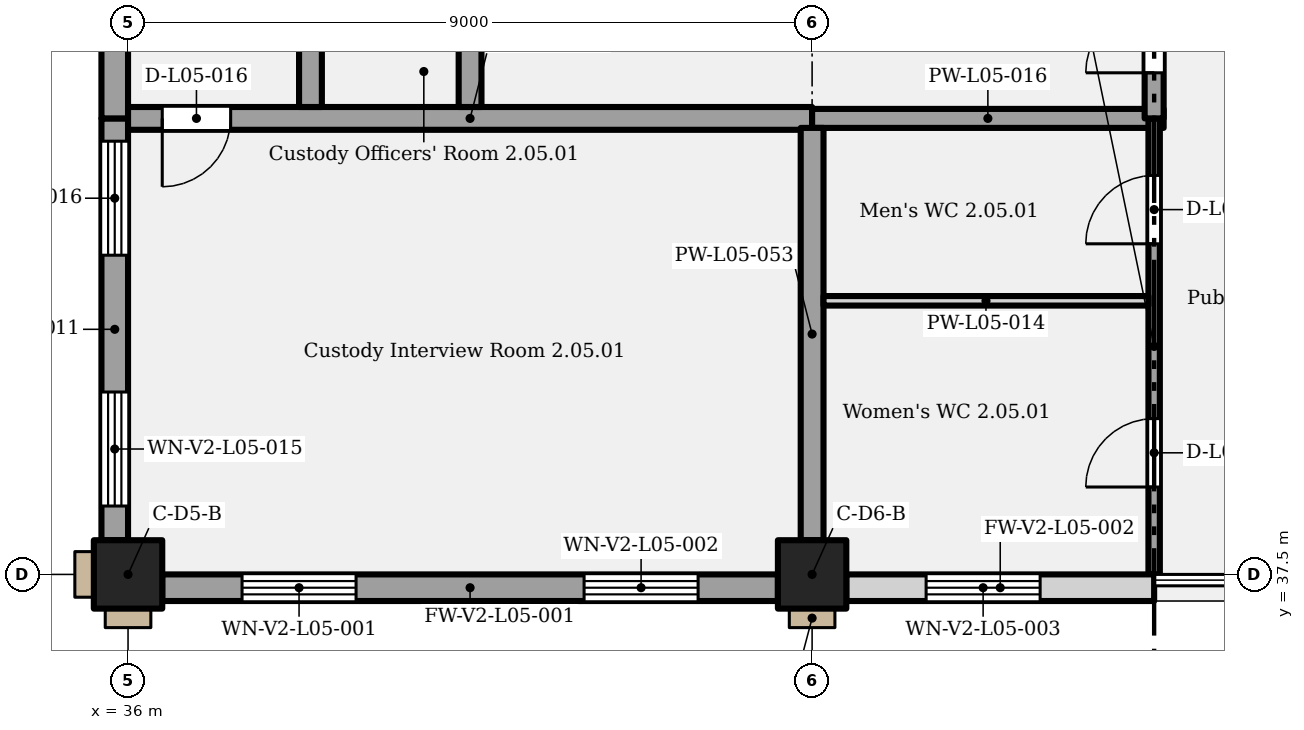
"""IFC4 building model, lengths in metres.
Left out: names, types, materials, properties, quantities, classifications, styles, units other than length and angle.
Written with IfcOpenShell. Run it as: python <this file> out.ifc"""

import sys

from ifc_helpers import new_model, si_unit, direction, frame, frame_2d, origin, origin_2d, place, context, subcontext, project, spatial, rectangle, extrude, element, fill, save


model = new_model("IFC4")
c1 = context("Model", 3, precision=1e-05, world=origin(), true_north=direction((0.0, 1.0)))
c2 = subcontext(c1, "Body", "Model", "MODEL_VIEW")
j1 = project(units=[si_unit("LENGTHUNIT", "METRE"), si_unit("PLANEANGLEUNIT", "RADIAN")], contexts=[c1])
p1 = place(None, origin())
s1 = spatial("IfcSite", under=j1, at=p1, CompositionType="ELEMENT")
p2 = place(p1, origin())
s2 = spatial("IfcBuilding", under=s1, at=p2, CompositionType="ELEMENT")
p3 = place(p2, frame((0.0, 0.0, 28.2)))
s3 = spatial("IfcBuildingStorey", under=s2, at=p3, CompositionType="ELEMENT", Elevation=28.2)
for number, where, z_axis, x_axis in (
    (1, (36.0, 37.5, 0.0), (0.0, 0.0, 1.0), (1.0, 0.0, 0.0)),
    (2, (45.0, 37.5, 0.0), (0.0, 0.0, 1.0), (1.0, 0.0, 0.0)),
):
    element("IfcColumn", number, at=place(p3, frame(where, z_axis=z_axis, x_axis=x_axis)), inside=s3, PredefinedType="COLUMN", context=c2, shape_type="SweptSolid", body=[
        extrude(rectangle(XDim=0.9, YDim=0.9, at=origin_2d()), origin(), (0.0, 0.0, 1.0), 5.4),
    ])
p4 = place(p3, frame((36.45, 37.325, 0.0), z_axis=(0.0, 0.0, 1.0), x_axis=(1.0, 0.0, 0.0)))
e3 = element("IfcWall", 3, at=p4, inside=s3, PredefinedType="SOLIDWALL", context=c2, shape_type="SweptSolid", body=[
    extrude(rectangle(XDim=8.1, YDim=0.35, at=frame_2d((4.05, 0.0))), origin(), (0.0, 0.0, 1.0), 5.15),
])
p5 = place(p4, frame((1.05, 0.0, 1.05)))
e4 = element("IfcOpeningElement", 4, at=p5, cuts=e3, PredefinedType="OPENING", context=c2, shape_type="SweptSolid", body=[
    extrude(rectangle(XDim=1.5, YDim=3.5, at=frame_2d((0.75, 1.75))), frame((0.0, 0.185, 0.0), z_axis=(0.0, -1.0, 0.0), x_axis=(1.0, 0.0, 0.0)), (0.0, 0.0, 1.0), 0.37),
])
p6 = place(p4, frame((5.55, 0.0, 1.05)))
e5 = element("IfcOpeningElement", 5, at=p6, cuts=e3, PredefinedType="OPENING", context=c2, shape_type="SweptSolid", body=[
    extrude(rectangle(XDim=1.5, YDim=3.5, at=frame_2d((0.75, 1.75))), frame((0.0, 0.185, 0.0), z_axis=(0.0, -1.0, 0.0), x_axis=(1.0, 0.0, 0.0)), (0.0, 0.0, 1.0), 0.37),
])
p7 = place(p3, frame((45.45, 37.325, 0.0), z_axis=(0.0, 0.0, 1.0), x_axis=(1.0, 0.0, 0.0)))
e6 = element("IfcWall", 6, at=p7, inside=s3, PredefinedType="SOLIDWALL", context=c2, shape_type="SweptSolid", body=[
    extrude(rectangle(XDim=4.05, YDim=0.35, at=frame_2d((2.025, 0.0))), origin(), (0.0, 0.0, 1.0), 5.15),
])
p8 = place(p7, frame((1.05, 0.0, 1.05)))
e7 = element("IfcOpeningElement", 7, at=p8, cuts=e6, PredefinedType="OPENING", context=c2, shape_type="SweptSolid", body=[
    extrude(rectangle(XDim=1.5, YDim=3.5, at=frame_2d((0.75, 1.75))), frame((0.0, 0.185, 0.0), z_axis=(0.0, -1.0, 0.0), x_axis=(1.0, 0.0, 0.0)), (0.0, 0.0, 1.0), 0.37),
])
p9 = place(p3, frame((35.825, 37.95, 0.0), z_axis=(0.0, 0.0, 1.0), x_axis=(0.0, 1.0, 0.0)))
e8 = element("IfcWall", 8, at=p9, inside=s3, PredefinedType="SOLIDWALL", context=c2, shape_type="SweptSolid", body=[
    extrude(rectangle(XDim=5.55, YDim=0.35, at=frame_2d((2.775, 0.0))), origin(), (0.0, 0.0, 1.0), 5.15),
])
p10 = place(p9, frame((0.45, 0.0, 1.05)))
e9 = element("IfcOpeningElement", 9, at=p10, cuts=e8, PredefinedType="OPENING", context=c2, shape_type="SweptSolid", body=[
    extrude(rectangle(XDim=1.5, YDim=3.5, at=frame_2d((0.75, 1.75))), frame((0.0, 0.185, 0.0), z_axis=(0.0, -1.0, 0.0), x_axis=(1.0, 0.0, 0.0)), (0.0, 0.0, 1.0), 0.37),
])
p11 = place(p9, frame((3.75, 0.0, 1.05)))
e10 = element("IfcOpeningElement", 10, at=p11, cuts=e8, PredefinedType="OPENING", context=c2, shape_type="SweptSolid", body=[
    extrude(rectangle(XDim=1.5, YDim=3.5, at=frame_2d((0.75, 1.75))), frame((0.0, 0.185, 0.0), z_axis=(0.0, -1.0, 0.0), x_axis=(1.0, 0.0, 0.0)), (0.0, 0.0, 1.0), 0.37),
])
p12 = place(p3, frame((35.825, 43.5, 0.0), z_axis=(0.0, 0.0, 1.0), x_axis=(0.0, 1.0, 0.0)))
e11 = element("IfcWall", 11, at=p12, inside=s3, PredefinedType="SOLIDWALL", context=c2, shape_type="SweptSolid", body=[
    extrude(rectangle(XDim=10.05, YDim=0.35, at=frame_2d((5.025, 0.0))), origin(), (0.0, 0.0, 1.0), 5.15),
])
p13 = place(p12, frame((1.5, 0.0, 1.05)))
e12 = element("IfcOpeningElement", 12, at=p13, cuts=e11, PredefinedType="OPENING", context=c2, shape_type="SweptSolid", body=[
    extrude(rectangle(XDim=1.5, YDim=3.5, at=frame_2d((0.75, 1.75))), frame((0.0, 0.185, 0.0), z_axis=(0.0, -1.0, 0.0), x_axis=(1.0, 0.0, 0.0)), (0.0, 0.0, 1.0), 0.37),
])
p14 = place(p12, frame((4.8, 0.0, 1.05)))
e13 = element("IfcOpeningElement", 13, at=p14, cuts=e11, PredefinedType="OPENING", context=c2, shape_type="SweptSolid", body=[
    extrude(rectangle(XDim=1.5, YDim=3.5, at=frame_2d((0.75, 1.75))), frame((0.0, 0.185, 0.0), z_axis=(0.0, -1.0, 0.0), x_axis=(1.0, 0.0, 0.0)), (0.0, 0.0, 1.0), 0.37),
])
p15 = place(p12, frame((8.1, 0.0, 1.05)))
e14 = element("IfcOpeningElement", 14, at=p15, cuts=e11, PredefinedType="OPENING", context=c2, shape_type="SweptSolid", body=[
    extrude(rectangle(XDim=1.5, YDim=3.5, at=frame_2d((0.75, 1.75))), frame((0.0, 0.185, 0.0), z_axis=(0.0, -1.0, 0.0), x_axis=(1.0, 0.0, 0.0)), (0.0, 0.0, 1.0), 0.37),
])
p16 = place(p3, frame((45.15, 41.1, 0.0), z_axis=(0.0, 0.0, 1.0), x_axis=(1.0, 0.0, 0.0)))
e15 = element("IfcWall", 15, at=p16, inside=s3, PredefinedType="PARTITIONING", context=c2, shape_type="SweptSolid", body=[
    extrude(rectangle(XDim=4.275, YDim=0.125, at=frame_2d((2.138, 0.0))), origin(), (0.0, 0.0, 1.0), 5.15),
])
p17 = place(p3, frame((36.0, 43.5, 0.0), z_axis=(0.0, 0.0, 1.0), x_axis=(1.0, 0.0, 0.0)))
e16 = element("IfcWall", 16, at=p17, inside=s3, PredefinedType="PARTITIONING", context=c2, shape_type="SweptSolid", body=[
    extrude(rectangle(XDim=9.0, YDim=0.3, at=frame_2d((4.5, 0.0))), origin(), (0.0, 0.0, 1.0), 5.15),
])
p18 = place(p17, frame((1.35, 0.0, 0.0), z_axis=(0.0, 0.0, 1.0), x_axis=(-1.0, 0.0, 0.0)))
e17 = element("IfcOpeningElement", 17, at=p18, cuts=e16, PredefinedType="OPENING", context=c2, shape_type="SweptSolid", body=[
    extrude(rectangle(XDim=0.9, YDim=2.1, at=frame_2d((0.45, 1.05))), frame((0.0, 0.16, 0.0), z_axis=(0.0, -1.0, 0.0), x_axis=(1.0, 0.0, 0.0)), (0.0, 0.0, 1.0), 0.32),
])
p19 = place(p3, frame((45.0, 43.5, 0.0), z_axis=(0.0, 0.0, 1.0), x_axis=(1.0, 0.0, 0.0)))
e18 = element("IfcWall", 18, at=p19, inside=s3, PredefinedType="PARTITIONING", context=c2, shape_type="SweptSolid", body=[
    extrude(rectangle(XDim=4.625, YDim=0.25, at=frame_2d((2.312, 0.0))), origin(), (0.0, 0.0, 1.0), 5.15),
])
p20 = place(p3, frame((38.4, 43.65, 0.0), z_axis=(0.0, 0.0, 1.0), x_axis=(0.0, 1.0, 0.0)))
e19 = element("IfcWall", 19, at=p20, inside=s3, PredefinedType="PARTITIONING", context=c2, shape_type="SweptSolid", body=[
    extrude(rectangle(XDim=10.35, YDim=0.3, at=frame_2d((5.175, 0.0))), origin(), (0.0, 0.0, 1.0), 5.15),
])
p21 = place(p20, frame((2.05, 0.0, 0.0), z_axis=(0.0, 0.0, 1.0), x_axis=(-1.0, 0.0, 0.0)))
e20 = element("IfcOpeningElement", 20, at=p21, cuts=e19, PredefinedType="OPENING", context=c2, shape_type="SweptSolid", body=[
    extrude(rectangle(XDim=0.9, YDim=2.1, at=frame_2d((0.45, 1.05))), frame((0.0, 0.16, 0.0), z_axis=(0.0, -1.0, 0.0), x_axis=(1.0, 0.0, 0.0)), (0.0, 0.0, 1.0), 0.32),
])
p22 = place(p20, frame((5.55, 0.0, 0.0), z_axis=(0.0, 0.0, 1.0), x_axis=(-1.0, 0.0, 0.0)))
e21 = element("IfcOpeningElement", 21, at=p22, cuts=e19, PredefinedType="OPENING", context=c2, shape_type="SweptSolid", body=[
    extrude(rectangle(XDim=0.9, YDim=2.0, at=frame_2d((0.45, 1.0))), frame((0.0, 0.16, 0.0), z_axis=(0.0, -1.0, 0.0), x_axis=(1.0, 0.0, 0.0)), (0.0, 0.0, 1.0), 0.32),
])
p23 = place(p20, frame((9.05, 0.0, 0.0), z_axis=(0.0, 0.0, 1.0), x_axis=(-1.0, 0.0, 0.0)))
e22 = element("IfcOpeningElement", 22, at=p23, cuts=e19, PredefinedType="OPENING", context=c2, shape_type="SweptSolid", body=[
    extrude(rectangle(XDim=0.9, YDim=2.0, at=frame_2d((0.45, 1.0))), frame((0.0, 0.16, 0.0), z_axis=(0.0, -1.0, 0.0), x_axis=(1.0, 0.0, 0.0)), (0.0, 0.0, 1.0), 0.32),
])
p24 = place(p3, frame((40.5, 43.65, 0.0), z_axis=(0.0, 0.0, 1.0), x_axis=(0.0, 1.0, 0.0)))
e23 = element("IfcWall", 23, at=p24, inside=s3, PredefinedType="PARTITIONING", context=c2, shape_type="SweptSolid", body=[
    extrude(rectangle(XDim=10.35, YDim=0.3, at=frame_2d((5.175, 0.0))), origin(), (0.0, 0.0, 1.0), 5.15),
])
p25 = place(p24, frame((9.1, 0.0, 0.0), z_axis=(0.0, 0.0, 1.0), x_axis=(-1.0, 0.0, 0.0)))
e24 = element("IfcOpeningElement", 24, at=p25, cuts=e23, PredefinedType="OPENING", context=c2, shape_type="SweptSolid", body=[
    extrude(rectangle(XDim=1.0, YDim=2.0, at=frame_2d((0.5, 1.0))), frame((0.0, 0.16, 0.0), z_axis=(0.0, -1.0, 0.0), x_axis=(1.0, 0.0, 0.0)), (0.0, 0.0, 1.0), 0.32),
])
p26 = place(p3, frame((45.0, 37.95, 0.0), z_axis=(0.0, 0.0, 1.0), x_axis=(0.0, 1.0, 0.0)))
e25 = element("IfcWall", 25, at=p26, inside=s3, PredefinedType="PARTITIONING", context=c2, shape_type="SweptSolid", body=[
    extrude(rectangle(XDim=5.425, YDim=0.3, at=frame_2d((2.712, 0.0))), origin(), (0.0, 0.0, 1.0), 4.2),
])
p27 = place(p3, frame((49.5, 37.5, 0.0), z_axis=(0.0, 0.0, 1.0), x_axis=(0.0, 1.0, 0.0)))
e26 = element("IfcWall", 26, at=p27, inside=s3, PredefinedType="PARTITIONING", context=c2, shape_type="SweptSolid", body=[
    extrude(rectangle(XDim=6.0, YDim=0.15, at=frame_2d((3.0, 0.0))), origin(), (0.0, 0.0, 1.0), 5.15),
])
p28 = place(p27, frame((1.15, 0.0, 0.0)))
e27 = element("IfcOpeningElement", 27, at=p28, cuts=e26, PredefinedType="OPENING", context=c2, shape_type="SweptSolid", body=[
    extrude(rectangle(XDim=0.9, YDim=2.1, at=frame_2d((0.45, 1.05))), frame((0.0, 0.085, 0.0), z_axis=(0.0, -1.0, 0.0), x_axis=(1.0, 0.0, 0.0)), (0.0, 0.0, 1.0), 0.17),
])
p29 = place(p27, frame((4.35, 0.0, 0.0)))
e28 = element("IfcOpeningElement", 28, at=p29, cuts=e26, PredefinedType="OPENING", context=c2, shape_type="SweptSolid", body=[
    extrude(rectangle(XDim=0.9, YDim=2.1, at=frame_2d((0.45, 1.05))), frame((0.0, 0.085, 0.0), z_axis=(0.0, -1.0, 0.0), x_axis=(1.0, 0.0, 0.0)), (0.0, 0.0, 1.0), 0.17),
])
p30 = place(p3, frame((49.5, 43.5, 0.0), z_axis=(0.0, 0.0, 1.0), x_axis=(0.0, 1.0, 0.0)))
e29 = element("IfcWall", 29, at=p30, inside=s3, PredefinedType="PARTITIONING", context=c2, shape_type="SweptSolid", body=[
    extrude(rectangle(XDim=10.5, YDim=0.25, at=frame_2d((5.25, 0.0))), origin(), (0.0, 0.0, 1.0), 5.15),
])
p31 = place(p30, frame((0.6, 0.0, 0.0)))
e30 = element("IfcOpeningElement", 30, at=p31, cuts=e29, PredefinedType="OPENING", context=c2, shape_type="SweptSolid", body=[
    extrude(rectangle(XDim=1.8, YDim=2.4, at=frame_2d((0.9, 1.2))), frame((0.0, 0.135, 0.0), z_axis=(0.0, -1.0, 0.0), x_axis=(1.0, 0.0, 0.0)), (0.0, 0.0, 1.0), 0.27),
])
p32 = place(p30, frame((7.1, 0.0, 0.0)))
e31 = element("IfcOpeningElement", 31, at=p32, cuts=e29, PredefinedType="OPENING", context=c2, shape_type="SweptSolid", body=[
    extrude(rectangle(XDim=1.8, YDim=2.4, at=frame_2d((0.9, 1.2))), frame((0.0, 0.135, 0.0), z_axis=(0.0, -1.0, 0.0), x_axis=(1.0, 0.0, 0.0)), (0.0, 0.0, 1.0), 0.27),
])
p33 = place(p5, origin())
e32 = element("IfcWindow", 32, at=p33, inside=s3, PartitioningType="SINGLE_PANEL", PredefinedType="WINDOW", context=c2, shape_type="SweptSolid", body=[
    extrude(rectangle(XDim=1.5, YDim=3.5, at=frame_2d((0.75, 1.75))), frame((0.0, 0.03, 0.0), z_axis=(0.0, -1.0, 0.0), x_axis=(1.0, 0.0, 0.0)), (0.0, 0.0, 1.0), 0.06),
])
fill(e4, e32)
p34 = place(p6, origin())
e33 = element("IfcWindow", 33, at=p34, inside=s3, PartitioningType="SINGLE_PANEL", PredefinedType="WINDOW", context=c2, shape_type="SweptSolid", body=[
    extrude(rectangle(XDim=1.5, YDim=3.5, at=frame_2d((0.75, 1.75))), frame((0.0, 0.03, 0.0), z_axis=(0.0, -1.0, 0.0), x_axis=(1.0, 0.0, 0.0)), (0.0, 0.0, 1.0), 0.06),
])
fill(e5, e33)
p35 = place(p8, origin())
e34 = element("IfcWindow", 34, at=p35, inside=s3, PartitioningType="SINGLE_PANEL", PredefinedType="WINDOW", context=c2, shape_type="SweptSolid", body=[
    extrude(rectangle(XDim=1.5, YDim=3.5, at=frame_2d((0.75, 1.75))), frame((0.0, 0.03, 0.0), z_axis=(0.0, -1.0, 0.0), x_axis=(1.0, 0.0, 0.0)), (0.0, 0.0, 1.0), 0.06),
])
fill(e7, e34)
p36 = place(p10, origin())
e35 = element("IfcWindow", 35, at=p36, inside=s3, PartitioningType="SINGLE_PANEL", PredefinedType="WINDOW", context=c2, shape_type="SweptSolid", body=[
    extrude(rectangle(XDim=1.5, YDim=3.5, at=frame_2d((0.75, 1.75))), frame((0.0, 0.03, 0.0), z_axis=(0.0, -1.0, 0.0), x_axis=(1.0, 0.0, 0.0)), (0.0, 0.0, 1.0), 0.06),
])
fill(e9, e35)
p37 = place(p11, origin())
e36 = element("IfcWindow", 36, at=p37, inside=s3, PartitioningType="SINGLE_PANEL", PredefinedType="WINDOW", context=c2, shape_type="SweptSolid", body=[
    extrude(rectangle(XDim=1.5, YDim=3.5, at=frame_2d((0.75, 1.75))), frame((0.0, 0.03, 0.0), z_axis=(0.0, -1.0, 0.0), x_axis=(1.0, 0.0, 0.0)), (0.0, 0.0, 1.0), 0.06),
])
fill(e10, e36)
p38 = place(p31, origin())
e37 = element("IfcDoor", 37, at=p38, inside=s3, OperationType="DOUBLE_DOOR_SINGLE_SWING", PredefinedType="DOOR", context=c2, shape_type="SweptSolid", body=[
    extrude(rectangle(XDim=1.8, YDim=2.4, at=frame_2d((0.9, 1.2))), frame((0.0, 0.025, 0.0), z_axis=(0.0, -1.0, 0.0), x_axis=(1.0, 0.0, 0.0)), (0.0, 0.0, 1.0), 0.05),
])
fill(e30, e37)
p39 = place(p18, origin())
e38 = element("IfcDoor", 38, at=p39, inside=s3, OperationType="SINGLE_SWING_RIGHT", PredefinedType="DOOR", context=c2, shape_type="SweptSolid", body=[
    extrude(rectangle(XDim=0.9, YDim=2.1, at=frame_2d((0.45, 1.05))), frame((0.0, 0.025, 0.0), z_axis=(0.0, -1.0, 0.0), x_axis=(1.0, 0.0, 0.0)), (0.0, 0.0, 1.0), 0.05),
])
fill(e17, e38)
p40 = place(p28, origin())
e39 = element("IfcDoor", 39, at=p40, inside=s3, OperationType="SINGLE_SWING_LEFT", PredefinedType="DOOR", context=c2, shape_type="SweptSolid", body=[
    extrude(rectangle(XDim=0.9, YDim=2.1, at=frame_2d((0.45, 1.05))), frame((0.0, 0.025, 0.0), z_axis=(0.0, -1.0, 0.0), x_axis=(1.0, 0.0, 0.0)), (0.0, 0.0, 1.0), 0.05),
])
fill(e27, e39)
p41 = place(p29, origin())
e40 = element("IfcDoor", 40, at=p41, inside=s3, OperationType="SINGLE_SWING_LEFT", PredefinedType="DOOR", context=c2, shape_type="SweptSolid", body=[
    extrude(rectangle(XDim=0.9, YDim=2.1, at=frame_2d((0.45, 1.05))), frame((0.0, 0.025, 0.0), z_axis=(0.0, -1.0, 0.0), x_axis=(1.0, 0.0, 0.0)), (0.0, 0.0, 1.0), 0.05),
])
fill(e28, e40)
save(model, sys.argv[1])
